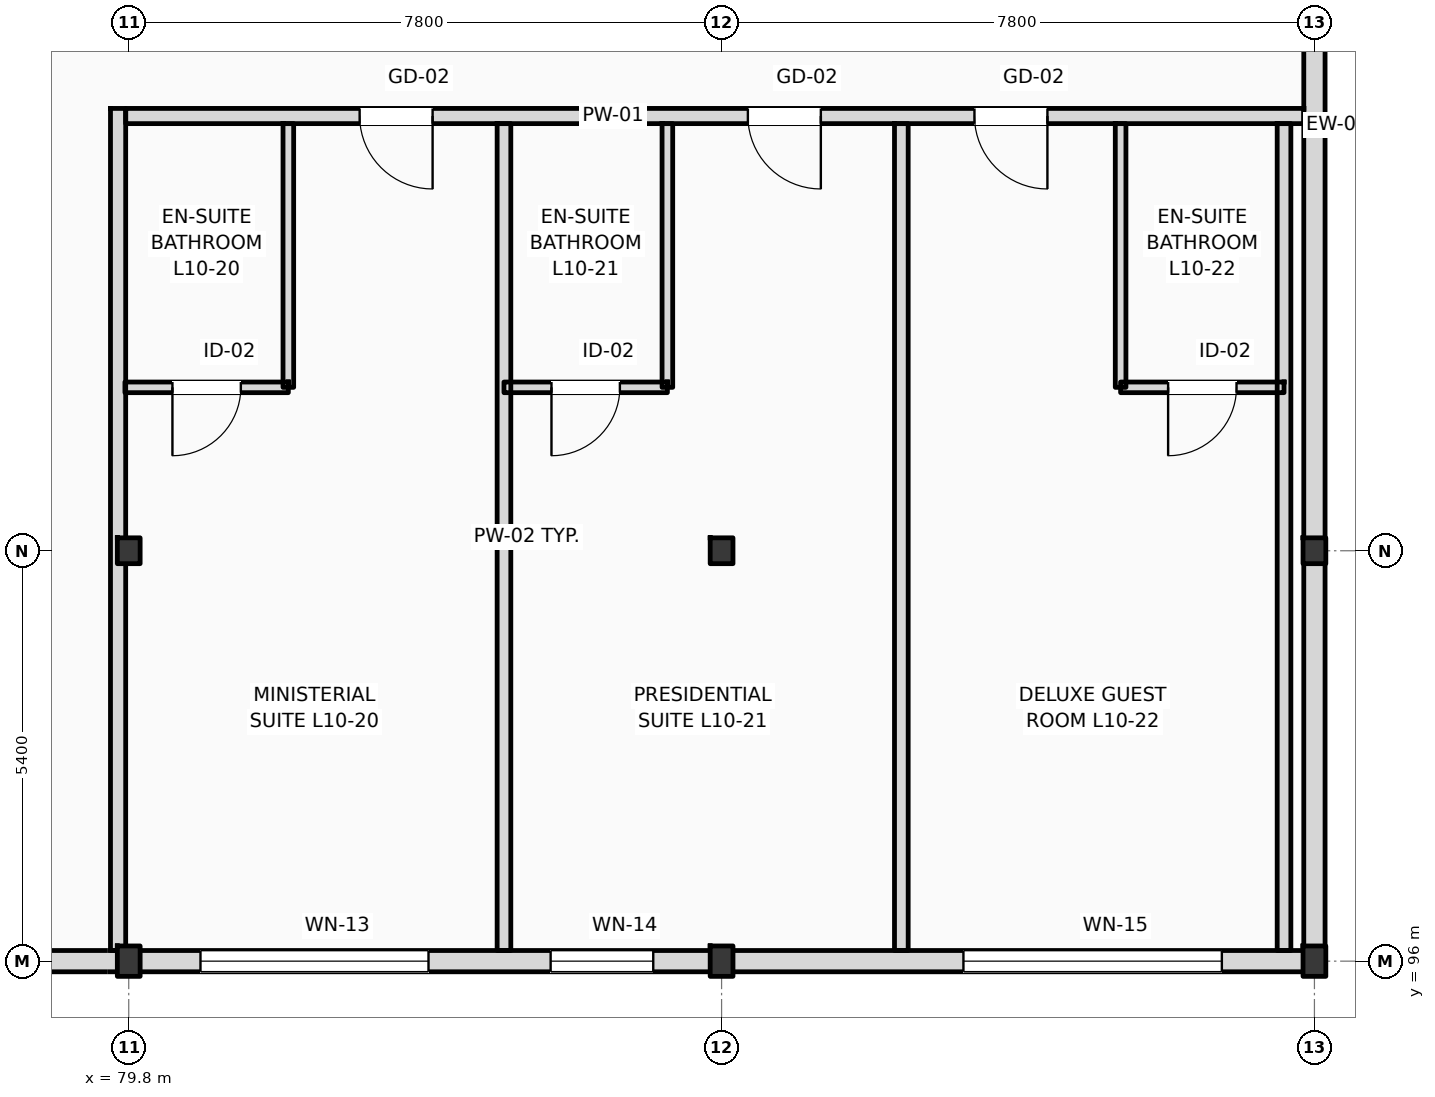
"""IFC4 building model, lengths in metres.
Left out: names, types, materials, properties, quantities, classifications, styles, units other than length and angle.
Written with IfcOpenShell. Run it as: python <this file> out.ifc"""

import sys

from ifc_helpers import new_model, si_unit, direction, frame, frame_2d, origin, origin_2d, place, context, subcontext, project, spatial, rectangle, i_section, extrude, element, fill, save


model = new_model("IFC4")
c1 = context("Model", 3, precision=1e-05, world=origin(), true_north=direction((0.0, 1.0)))
c2 = subcontext(c1, "Body", "Model", "MODEL_VIEW")
j1 = project(units=[si_unit("LENGTHUNIT", "METRE"), si_unit("PLANEANGLEUNIT", "RADIAN")], contexts=[c1])
p1 = place(None, origin())
s1 = spatial("IfcSite", under=j1, at=p1, CompositionType="ELEMENT")
p2 = place(p1, origin())
s2 = spatial("IfcBuilding", under=s1, at=p2, CompositionType="ELEMENT")
p3 = place(p2, frame((0.0, 0.0, 42.6)))
s3 = spatial("IfcBuildingStorey", under=s2, at=p3, CompositionType="ELEMENT", Elevation=42.6)
p4 = place(p3, frame((79.8, 96.0, 0.0), z_axis=(0.0, 0.0, 1.0), x_axis=(1.0, 0.0, 0.0)))
e1 = element("IfcColumn", 1, at=p4, inside=s3, PredefinedType="COLUMN", context=c2, shape_type="SweptSolid", body=[
    extrude(i_section(OverallWidth=0.3, OverallDepth=0.4, WebThickness=0.013, FlangeThickness=0.024, FilletRadius=0.027, at=origin_2d()), origin(), (0.0, 0.0, 1.0), 4.2),
])
p5 = place(p3, frame((79.8, 101.4, 0.0), z_axis=(0.0, 0.0, 1.0), x_axis=(1.0, 0.0, 0.0)))
e2 = element("IfcColumn", 2, at=p5, inside=s3, PredefinedType="COLUMN", context=c2, shape_type="SweptSolid", body=[
    extrude(i_section(OverallWidth=0.3, OverallDepth=0.34, WebThickness=0.012, FlangeThickness=0.021, FilletRadius=0.027, at=origin_2d()), origin(), (0.0, 0.0, 1.0), 4.2),
])
p6 = place(p3, frame((87.6, 96.0, 0.0), z_axis=(0.0, 0.0, 1.0), x_axis=(1.0, 0.0, 0.0)))
e3 = element("IfcColumn", 3, at=p6, inside=s3, PredefinedType="COLUMN", context=c2, shape_type="SweptSolid", body=[
    extrude(i_section(OverallWidth=0.3, OverallDepth=0.4, WebThickness=0.013, FlangeThickness=0.024, FilletRadius=0.027, at=origin_2d()), origin(), (0.0, 0.0, 1.0), 4.2),
])
p7 = place(p3, frame((87.6, 101.4, 0.0), z_axis=(0.0, 0.0, 1.0), x_axis=(1.0, 0.0, 0.0)))
e4 = element("IfcColumn", 4, at=p7, inside=s3, PredefinedType="COLUMN", context=c2, shape_type="SweptSolid", body=[
    extrude(i_section(OverallWidth=0.3, OverallDepth=0.34, WebThickness=0.012, FlangeThickness=0.021, FilletRadius=0.027, at=origin_2d()), origin(), (0.0, 0.0, 1.0), 4.2),
])
p8 = place(p3, frame((95.4, 96.0, 0.0), z_axis=(0.0, 0.0, 1.0), x_axis=(1.0, 0.0, 0.0)))
e5 = element("IfcColumn", 5, at=p8, inside=s3, PredefinedType="COLUMN", context=c2, shape_type="SweptSolid", body=[
    extrude(i_section(OverallWidth=0.3, OverallDepth=0.4, WebThickness=0.013, FlangeThickness=0.024, FilletRadius=0.027, at=origin_2d()), origin(), (0.0, 0.0, 1.0), 4.2),
])
p9 = place(p3, frame((95.4, 101.4, 0.0), z_axis=(0.0, 0.0, 1.0), x_axis=(1.0, 0.0, 0.0)))
e6 = element("IfcColumn", 6, at=p9, inside=s3, PredefinedType="COLUMN", context=c2, shape_type="SweptSolid", body=[
    extrude(i_section(OverallWidth=0.3, OverallDepth=0.34, WebThickness=0.012, FlangeThickness=0.021, FilletRadius=0.027, at=origin_2d()), origin(), (0.0, 0.0, 1.0), 4.2),
])
p10 = place(p3, frame((95.4, 96.0, 0.0), z_axis=(0.0, 0.0, 1.0), x_axis=(0.0, 1.0, 0.0)))
e7 = element("IfcWall", 7, at=p10, inside=s3, PredefinedType="STANDARD", context=c2, shape_type="SweptSolid", body=[
    extrude(rectangle(XDim=22.0, YDim=0.28, at=frame_2d((11.0, 0.0))), origin(), (0.0, 0.0, 1.0), 3.51),
])
p11 = place(p3, frame((25.2, 96.0, 0.0), z_axis=(0.0, 0.0, 1.0), x_axis=(1.0, 0.0, 0.0)))
e8 = element("IfcWall", 8, at=p11, inside=s3, PredefinedType="STANDARD", context=c2, shape_type="SweptSolid", body=[
    extrude(rectangle(XDim=70.2, YDim=0.28, at=frame_2d((35.1, 0.0))), origin(), (0.0, 0.0, 1.0), 3.42),
])
p12 = place(p11, frame((16.83, 0.0, 0.9)))
e9 = element("IfcOpeningElement", 9, at=p12, cuts=e8, PredefinedType="OPENING", context=c2, shape_type="SweptSolid", body=[
    extrude(rectangle(XDim=2.25, YDim=2.15, at=frame_2d((1.125, 1.075))), frame((0.0, 0.15, 0.0), z_axis=(0.0, -1.0, 0.0), x_axis=(1.0, 0.0, 0.0)), (0.0, 0.0, 1.0), 0.3),
])
p13 = place(p11, frame((20.815, 0.0, 0.9)))
e10 = element("IfcOpeningElement", 10, at=p13, cuts=e8, PredefinedType="OPENING", context=c2, shape_type="SweptSolid", body=[
    extrude(rectangle(XDim=1.8, YDim=2.2, at=frame_2d((0.9, 1.1))), frame((0.0, 0.15, 0.0), z_axis=(0.0, -1.0, 0.0), x_axis=(1.0, 0.0, 0.0)), (0.0, 0.0, 1.0), 0.3),
])
p14 = place(p11, frame((26.03, 0.0, 0.9)))
e11 = element("IfcOpeningElement", 11, at=p14, cuts=e8, PredefinedType="OPENING", context=c2, shape_type="SweptSolid", body=[
    extrude(rectangle(XDim=2.55, YDim=2.25, at=frame_2d((1.275, 1.125))), frame((0.0, 0.15, 0.0), z_axis=(0.0, -1.0, 0.0), x_axis=(1.0, 0.0, 0.0)), (0.0, 0.0, 1.0), 0.3),
])
p15 = place(p11, frame((32.045, 0.0, 0.9)))
e12 = element("IfcOpeningElement", 12, at=p15, cuts=e8, PredefinedType="OPENING", context=c2, shape_type="SweptSolid", body=[
    extrude(rectangle(XDim=1.35, YDim=2.3, at=frame_2d((0.675, 1.15))), frame((0.0, 0.15, 0.0), z_axis=(0.0, -1.0, 0.0), x_axis=(1.0, 0.0, 0.0)), (0.0, 0.0, 1.0), 0.3),
])
p16 = place(p11, frame((35.2, 0.0, 0.9)))
e13 = element("IfcOpeningElement", 13, at=p16, cuts=e8, PredefinedType="OPENING", context=c2, shape_type="SweptSolid", body=[
    extrude(rectangle(XDim=2.85, YDim=2.34, at=frame_2d((1.425, 1.17))), frame((0.0, 0.15, 0.0), z_axis=(0.0, -1.0, 0.0), x_axis=(1.0, 0.0, 0.0)), (0.0, 0.0, 1.0), 0.3),
])
p17 = place(p11, frame((55.544, 0.0, 0.9)))
e14 = element("IfcOpeningElement", 14, at=p17, cuts=e8, PredefinedType="OPENING", context=c2, shape_type="SweptSolid", body=[
    extrude(rectangle(XDim=3.0, YDim=2.34, at=frame_2d((1.5, 1.17))), frame((0.0, 0.15, 0.0), z_axis=(0.0, -1.0, 0.0), x_axis=(1.0, 0.0, 0.0)), (0.0, 0.0, 1.0), 0.3),
])
p18 = place(p11, frame((60.151, 0.0, 0.9)))
e15 = element("IfcOpeningElement", 15, at=p18, cuts=e8, PredefinedType="OPENING", context=c2, shape_type="SweptSolid", body=[
    extrude(rectangle(XDim=1.35, YDim=2.34, at=frame_2d((0.675, 1.17))), frame((0.0, 0.15, 0.0), z_axis=(0.0, -1.0, 0.0), x_axis=(1.0, 0.0, 0.0)), (0.0, 0.0, 1.0), 0.3),
])
p19 = place(p11, frame((65.582, 0.0, 0.9)))
e16 = element("IfcOpeningElement", 16, at=p19, cuts=e8, PredefinedType="OPENING", context=c2, shape_type="SweptSolid", body=[
    extrude(rectangle(XDim=3.4, YDim=2.34, at=frame_2d((1.7, 1.17))), frame((0.0, 0.15, 0.0), z_axis=(0.0, -1.0, 0.0), x_axis=(1.0, 0.0, 0.0)), (0.0, 0.0, 1.0), 0.3),
])
p20 = place(p3, frame((79.76, 107.12, 0.0), z_axis=(0.0, 0.0, 1.0), x_axis=(1.0, 0.0, 0.0)))
e17 = element("IfcWall", 17, at=p20, inside=s3, PredefinedType="PARTITIONING", context=c2, shape_type="SweptSolid", body=[
    extrude(rectangle(XDim=15.5, YDim=0.2, at=frame_2d((7.75, 0.0))), origin(), (0.0, 0.0, 1.0), 3.94),
])
p21 = place(p20, frame((3.078, 0.0, 0.0)))
e18 = element("IfcOpeningElement", 18, at=p21, cuts=e17, PredefinedType="OPENING", context=c2, shape_type="SweptSolid", body=[
    extrude(rectangle(XDim=0.96, YDim=2.2, at=frame_2d((0.48, 1.1))), frame((0.0, 0.11, 0.0), z_axis=(0.0, -1.0, 0.0), x_axis=(1.0, 0.0, 0.0)), (0.0, 0.0, 1.0), 0.22),
])
p22 = place(p20, frame((8.186, 0.0, 0.0)))
e19 = element("IfcOpeningElement", 19, at=p22, cuts=e17, PredefinedType="OPENING", context=c2, shape_type="SweptSolid", body=[
    extrude(rectangle(XDim=0.96, YDim=2.2, at=frame_2d((0.48, 1.1))), frame((0.0, 0.11, 0.0), z_axis=(0.0, -1.0, 0.0), x_axis=(1.0, 0.0, 0.0)), (0.0, 0.0, 1.0), 0.22),
])
p23 = place(p20, frame((11.167, 0.0, 0.0)))
e20 = element("IfcOpeningElement", 20, at=p23, cuts=e17, PredefinedType="OPENING", context=c2, shape_type="SweptSolid", body=[
    extrude(rectangle(XDim=0.96, YDim=2.2, at=frame_2d((0.48, 1.1))), frame((0.0, 0.11, 0.0), z_axis=(0.0, -1.0, 0.0), x_axis=(1.0, 0.0, 0.0)), (0.0, 0.0, 1.0), 0.22),
])
p24 = place(p3, frame((79.66, 96.14, 0.0), z_axis=(0.0, 0.0, 1.0), x_axis=(0.0, 1.0, 0.0)))
e21 = element("IfcWall", 21, at=p24, inside=s3, PredefinedType="PARTITIONING", context=c2, shape_type="SweptSolid", body=[
    extrude(rectangle(XDim=11.08, YDim=0.2, at=frame_2d((5.54, 0.0))), origin(), (0.0, 0.0, 1.0), 3.51),
])
p25 = place(p3, frame((84.737, 96.14, 0.0), z_axis=(0.0, 0.0, 1.0), x_axis=(0.0, 1.0, 0.0)))
e22 = element("IfcWall", 22, at=p25, inside=s3, PredefinedType="PARTITIONING", context=c2, shape_type="SweptSolid", body=[
    extrude(rectangle(XDim=10.88, YDim=0.18, at=frame_2d((5.44, 0.0))), origin(), (0.0, 0.0, 1.0), 3.94),
])
p26 = place(p3, frame((81.9, 103.55, 0.0), z_axis=(0.0, 0.0, 1.0), x_axis=(0.0, 1.0, 0.0)))
e23 = element("IfcWall", 23, at=p26, inside=s3, PredefinedType="PARTITIONING", context=c2, shape_type="SweptSolid", body=[
    extrude(rectangle(XDim=3.47, YDim=0.14, at=frame_2d((1.735, 0.0))), origin(), (0.0, 0.0, 1.0), 3.94),
])
p27 = place(p3, frame((79.75, 103.55, 0.0), z_axis=(0.0, 0.0, 1.0), x_axis=(1.0, 0.0, 0.0)))
e24 = element("IfcWall", 24, at=p27, inside=s3, PredefinedType="PARTITIONING", context=c2, shape_type="SweptSolid", body=[
    extrude(rectangle(XDim=2.15, YDim=0.14, at=frame_2d((1.075, 0.0))), origin(), (0.0, 0.0, 1.0), 3.94),
])
p28 = place(p27, frame((0.625, 0.0, 0.0)))
e25 = element("IfcOpeningElement", 25, at=p28, cuts=e24, PredefinedType="OPENING", context=c2, shape_type="SweptSolid", body=[
    extrude(rectangle(XDim=0.9, YDim=2.1, at=frame_2d((0.45, 1.05))), frame((0.0, 0.08, 0.0), z_axis=(0.0, -1.0, 0.0), x_axis=(1.0, 0.0, 0.0)), (0.0, 0.0, 1.0), 0.16),
])
p29 = place(p3, frame((89.965, 96.14, 0.0), z_axis=(0.0, 0.0, 1.0), x_axis=(0.0, 1.0, 0.0)))
e26 = element("IfcWall", 26, at=p29, inside=s3, PredefinedType="PARTITIONING", context=c2, shape_type="SweptSolid", body=[
    extrude(rectangle(XDim=10.88, YDim=0.18, at=frame_2d((5.44, 0.0))), origin(), (0.0, 0.0, 1.0), 3.57),
])
p30 = place(p3, frame((86.887, 103.55, 0.0), z_axis=(0.0, 0.0, 1.0), x_axis=(0.0, 1.0, 0.0)))
e27 = element("IfcWall", 27, at=p30, inside=s3, PredefinedType="PARTITIONING", context=c2, shape_type="SweptSolid", body=[
    extrude(rectangle(XDim=3.47, YDim=0.14, at=frame_2d((1.735, 0.0))), origin(), (0.0, 0.0, 1.0), 3.94),
])
p31 = place(p3, frame((84.737, 103.55, 0.0), z_axis=(0.0, 0.0, 1.0), x_axis=(1.0, 0.0, 0.0)))
e28 = element("IfcWall", 28, at=p31, inside=s3, PredefinedType="PARTITIONING", context=c2, shape_type="SweptSolid", body=[
    extrude(rectangle(XDim=2.15, YDim=0.14, at=frame_2d((1.075, 0.0))), origin(), (0.0, 0.0, 1.0), 3.94),
])
p32 = place(p31, frame((0.625, 0.0, 0.0)))
e29 = element("IfcOpeningElement", 29, at=p32, cuts=e28, PredefinedType="OPENING", context=c2, shape_type="SweptSolid", body=[
    extrude(rectangle(XDim=0.9, YDim=2.1, at=frame_2d((0.45, 1.05))), frame((0.0, 0.08, 0.0), z_axis=(0.0, -1.0, 0.0), x_axis=(1.0, 0.0, 0.0)), (0.0, 0.0, 1.0), 0.16),
])
p33 = place(p3, frame((95.0, 96.14, 0.0), z_axis=(0.0, 0.0, 1.0), x_axis=(0.0, 1.0, 0.0)))
e30 = element("IfcWall", 30, at=p33, inside=s3, PredefinedType="PARTITIONING", context=c2, shape_type="SweptSolid", body=[
    extrude(rectangle(XDim=10.88, YDim=0.18, at=frame_2d((5.44, 0.0))), origin(), (0.0, 0.0, 1.0), 3.94),
])
p34 = place(p3, frame((92.85, 103.55, 0.0), z_axis=(0.0, 0.0, 1.0), x_axis=(0.0, 1.0, 0.0)))
e31 = element("IfcWall", 31, at=p34, inside=s3, PredefinedType="PARTITIONING", context=c2, shape_type="SweptSolid", body=[
    extrude(rectangle(XDim=3.47, YDim=0.14, at=frame_2d((1.735, 0.0))), origin(), (0.0, 0.0, 1.0), 3.57),
])
p35 = place(p3, frame((92.85, 103.55, 0.0), z_axis=(0.0, 0.0, 1.0), x_axis=(1.0, 0.0, 0.0)))
e32 = element("IfcWall", 32, at=p35, inside=s3, PredefinedType="PARTITIONING", context=c2, shape_type="SweptSolid", body=[
    extrude(rectangle(XDim=2.15, YDim=0.14, at=frame_2d((1.075, 0.0))), origin(), (0.0, 0.0, 1.0), 3.94),
])
p36 = place(p35, frame((0.625, 0.0, 0.0)))
e33 = element("IfcOpeningElement", 33, at=p36, cuts=e32, PredefinedType="OPENING", context=c2, shape_type="SweptSolid", body=[
    extrude(rectangle(XDim=0.9, YDim=2.1, at=frame_2d((0.45, 1.05))), frame((0.0, 0.08, 0.0), z_axis=(0.0, -1.0, 0.0), x_axis=(1.0, 0.0, 0.0)), (0.0, 0.0, 1.0), 0.16),
])
p37 = place(p17, origin())
e34 = element("IfcWindow", 34, at=p37, inside=s3, PartitioningType="DOUBLE_PANEL_VERTICAL", PredefinedType="WINDOW", context=c2, shape_type="SweptSolid", body=[
    extrude(rectangle(XDim=3.0, YDim=2.34, at=frame_2d((1.5, 1.17))), frame((0.0, 0.03, 0.0), z_axis=(0.0, -1.0, 0.0), x_axis=(1.0, 0.0, 0.0)), (0.0, 0.0, 1.0), 0.06),
])
fill(e14, e34)
p38 = place(p18, origin())
e35 = element("IfcWindow", 35, at=p38, inside=s3, PartitioningType="DOUBLE_PANEL_VERTICAL", PredefinedType="WINDOW", context=c2, shape_type="SweptSolid", body=[
    extrude(rectangle(XDim=1.35, YDim=2.34, at=frame_2d((0.675, 1.17))), frame((0.0, 0.03, 0.0), z_axis=(0.0, -1.0, 0.0), x_axis=(1.0, 0.0, 0.0)), (0.0, 0.0, 1.0), 0.06),
])
fill(e15, e35)
p39 = place(p19, origin())
e36 = element("IfcWindow", 36, at=p39, inside=s3, PartitioningType="DOUBLE_PANEL_VERTICAL", PredefinedType="WINDOW", context=c2, shape_type="SweptSolid", body=[
    extrude(rectangle(XDim=3.4, YDim=2.34, at=frame_2d((1.7, 1.17))), frame((0.0, 0.03, 0.0), z_axis=(0.0, -1.0, 0.0), x_axis=(1.0, 0.0, 0.0)), (0.0, 0.0, 1.0), 0.06),
])
fill(e16, e36)
p40 = place(p21, frame((0.96, 0.0, 0.0), z_axis=(0.0, 0.0, 1.0), x_axis=(-1.0, 0.0, 0.0)))
e37 = element("IfcDoor", 37, at=p40, inside=s3, OperationType="SINGLE_SWING_RIGHT", PredefinedType="DOOR", context=c2, shape_type="SweptSolid", body=[
    extrude(rectangle(XDim=0.96, YDim=2.2, at=frame_2d((0.48, 1.1))), frame((0.0, 0.025, 0.0), z_axis=(0.0, -1.0, 0.0), x_axis=(1.0, 0.0, 0.0)), (0.0, 0.0, 1.0), 0.05),
])
fill(e18, e37)
p41 = place(p28, frame((0.9, 0.0, 0.0), z_axis=(0.0, 0.0, 1.0), x_axis=(-1.0, 0.0, 0.0)))
e38 = element("IfcDoor", 38, at=p41, inside=s3, OperationType="SINGLE_SWING_LEFT", PredefinedType="DOOR", context=c2, shape_type="SweptSolid", body=[
    extrude(rectangle(XDim=0.9, YDim=2.1, at=frame_2d((0.45, 1.05))), frame((0.0, 0.025, 0.0), z_axis=(0.0, -1.0, 0.0), x_axis=(1.0, 0.0, 0.0)), (0.0, 0.0, 1.0), 0.05),
])
fill(e25, e38)
p42 = place(p22, frame((0.96, 0.0, 0.0), z_axis=(0.0, 0.0, 1.0), x_axis=(-1.0, 0.0, 0.0)))
e39 = element("IfcDoor", 39, at=p42, inside=s3, OperationType="SINGLE_SWING_RIGHT", PredefinedType="DOOR", context=c2, shape_type="SweptSolid", body=[
    extrude(rectangle(XDim=0.96, YDim=2.2, at=frame_2d((0.48, 1.1))), frame((0.0, 0.025, 0.0), z_axis=(0.0, -1.0, 0.0), x_axis=(1.0, 0.0, 0.0)), (0.0, 0.0, 1.0), 0.05),
])
fill(e19, e39)
p43 = place(p32, frame((0.9, 0.0, 0.0), z_axis=(0.0, 0.0, 1.0), x_axis=(-1.0, 0.0, 0.0)))
e40 = element("IfcDoor", 40, at=p43, inside=s3, OperationType="SINGLE_SWING_LEFT", PredefinedType="DOOR", context=c2, shape_type="SweptSolid", body=[
    extrude(rectangle(XDim=0.9, YDim=2.1, at=frame_2d((0.45, 1.05))), frame((0.0, 0.025, 0.0), z_axis=(0.0, -1.0, 0.0), x_axis=(1.0, 0.0, 0.0)), (0.0, 0.0, 1.0), 0.05),
])
fill(e29, e40)
p44 = place(p23, frame((0.96, 0.0, 0.0), z_axis=(0.0, 0.0, 1.0), x_axis=(-1.0, 0.0, 0.0)))
e41 = element("IfcDoor", 41, at=p44, inside=s3, OperationType="SINGLE_SWING_RIGHT", PredefinedType="DOOR", context=c2, shape_type="SweptSolid", body=[
    extrude(rectangle(XDim=0.96, YDim=2.2, at=frame_2d((0.48, 1.1))), frame((0.0, 0.025, 0.0), z_axis=(0.0, -1.0, 0.0), x_axis=(1.0, 0.0, 0.0)), (0.0, 0.0, 1.0), 0.05),
])
fill(e20, e41)
p45 = place(p36, frame((0.9, 0.0, 0.0), z_axis=(0.0, 0.0, 1.0), x_axis=(-1.0, 0.0, 0.0)))
e42 = element("IfcDoor", 42, at=p45, inside=s3, OperationType="SINGLE_SWING_LEFT", PredefinedType="DOOR", context=c2, shape_type="SweptSolid", body=[
    extrude(rectangle(XDim=0.9, YDim=2.1, at=frame_2d((0.45, 1.05))), frame((0.0, 0.025, 0.0), z_axis=(0.0, -1.0, 0.0), x_axis=(1.0, 0.0, 0.0)), (0.0, 0.0, 1.0), 0.05),
])
fill(e33, e42)
save(model, sys.argv[1])
